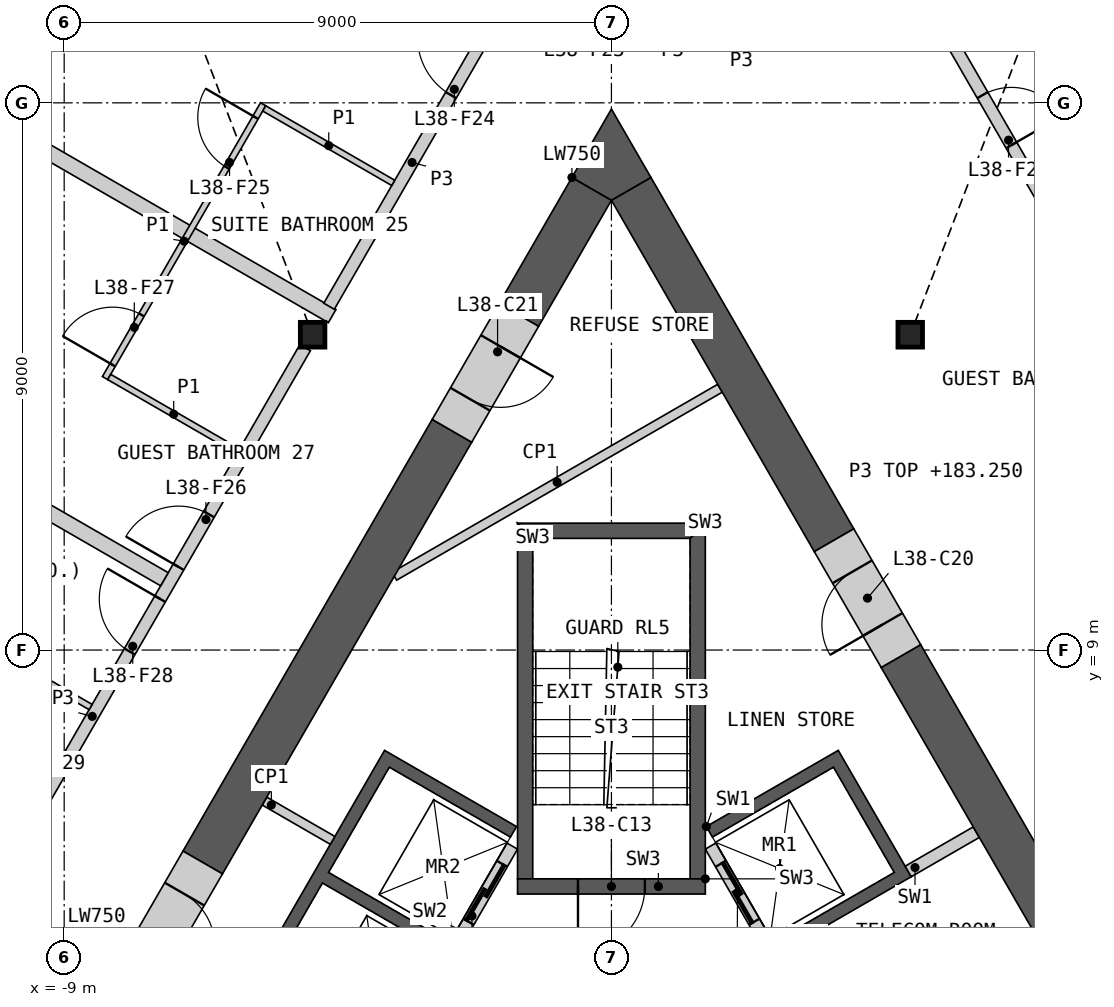
"""IFC4 building model, lengths in metres.
Left out: names, types, materials, properties, quantities, classifications, styles, units other than length and angle.
Written with IfcOpenShell. Run it as: python <this file> out.ifc"""

import sys

from ifc_helpers import new_model, si_unit, direction, frame, frame_2d, origin, origin_2d, place, context, subcontext, project, spatial, polyline, rectangle, i_section, outline, extrude, element, fill, save


model = new_model("IFC4")
c1 = context("Model", 3, precision=1e-05, world=origin(), true_north=direction((0.0, 1.0)))
c2 = subcontext(c1, "Body", "Model", "MODEL_VIEW")
j1 = project(units=[si_unit("LENGTHUNIT", "METRE"), si_unit("PLANEANGLEUNIT", "RADIAN")], contexts=[c1])
p1 = place(None, origin())
s1 = spatial("IfcSite", under=j1, at=p1, CompositionType="ELEMENT")
p2 = place(p1, origin())
s2 = spatial("IfcBuilding", under=s1, at=p2, CompositionType="ELEMENT")
p3 = place(p2, frame((0.0, 0.0, 180.0)))
s3 = spatial("IfcBuildingStorey", under=s2, at=p3, CompositionType="ELEMENT", Elevation=180.0)
for number, where, z_axis, x_axis in (
    (1, (-4.914, 14.186, 0.0), (0.0, 0.0, 1.0), (1.0, 0.0, 0.0)),
    (2, (4.914, 14.186, 0.0), (0.0, 0.0, 1.0), (1.0, 0.0, 0.0)),
):
    element("IfcColumn", number, at=place(p3, frame(where, z_axis=z_axis, x_axis=x_axis)), inside=s3, PredefinedType="COLUMN", context=c2, shape_type="SweptSolid", body=[
        extrude(i_section(OverallWidth=0.404, OverallDepth=0.407, WebThickness=0.027, FlangeThickness=0.044, at=origin_2d()), origin(), (0.0, 0.0, 1.0), 3.6),
    ])
p4 = place(p3, origin())
e3 = element("IfcWall", 3, at=p4, inside=s3, PredefinedType="SHEAR", context=c2, shape_type="SweptSolid", body=[
    extrude(outline(polyline([(1.561, 6.097), (3.731, 7.35), (4.931, 5.272), (2.76, 4.019), (2.66, 4.192), (4.652, 5.342), (3.652, 7.074), (1.66, 5.924), (1.561, 6.097)])), origin(), (0.0, 0.0, 1.0), 3.25),
])
p5 = place(p3, frame((5.817, -1.476, 0.0), z_axis=(0.0, 0.0, 1.0), x_axis=(-0.500002616675, 0.866023893041, 0.0)))
e4 = element("IfcWall", 4, at=p5, inside=s3, PredefinedType="SOLIDWALL", context=c2, shape_type="SweptSolid", body=[
    extrude(rectangle(XDim=8.373, YDim=0.2, at=frame_2d((4.187, 0.0))), origin(), (0.0, 0.0, 1.0), 3.25),
])
p6 = place(p5, frame((1.537, 0.0, 0.0)))
e5 = element("IfcOpeningElement", 5, at=p6, cuts=e4, PredefinedType="OPENING", context=c2, shape_type="SweptSolid", body=[
    extrude(rectangle(XDim=0.9, YDim=2.1, at=frame_2d((0.45, 1.05))), frame((0.0, 0.11, 0.0), z_axis=(0.0, -1.0, 0.0), x_axis=(1.0, 0.0, 0.0)), (0.0, 0.0, 1.0), 0.22),
])
p7 = place(p5, frame((4.837, 0.0, 0.0)))
e6 = element("IfcOpeningElement", 6, at=p7, cuts=e4, PredefinedType="OPENING", context=c2, shape_type="SweptSolid", body=[
    extrude(rectangle(XDim=0.9, YDim=2.1, at=frame_2d((0.45, 1.05))), frame((0.0, 0.11, 0.0), z_axis=(0.0, -1.0, 0.0), x_axis=(1.0, 0.0, 0.0)), (0.0, 0.0, 1.0), 0.22),
])
p8 = place(p5, frame((6.937, 0.0, 0.0)))
e7 = element("IfcOpeningElement", 7, at=p8, cuts=e4, PredefinedType="OPENING", context=c2, shape_type="SweptSolid", body=[
    extrude(rectangle(XDim=1.1, YDim=2.1, at=frame_2d((0.55, 1.05))), frame((0.0, 0.11, 0.0), z_axis=(0.0, -1.0, 0.0), x_axis=(1.0, 0.0, 0.0)), (0.0, 0.0, 1.0), 0.22),
])
p9 = place(p3, frame((4.881, 5.358, 0.0), z_axis=(0.0, 0.0, 1.0), x_axis=(0.866084958089, 0.499896834728, 0.0)))
e8 = element("IfcWall", 8, at=p9, inside=s3, PredefinedType="SHEAR", context=c2, shape_type="SweptSolid", body=[
    extrude(rectangle(XDim=1.293, YDim=0.2, at=frame_2d((0.646, 0.0))), origin(), (0.0, 0.0, 1.0), 3.25),
])
p10 = place(p3, origin())
e9 = element("IfcWall", 9, at=p10, inside=s3, PredefinedType="SHEAR", context=c2, shape_type="SweptSolid", body=[
    extrude(outline(polyline([(-4.96, 0.208), (-7.131, 1.461), (-3.731, 7.35), (-1.561, 6.097), (-1.66, 5.924), (-3.652, 7.074), (-4.652, 5.342), (-2.66, 4.192), (-2.76, 4.019), (-4.752, 5.169), (-5.752, 3.437), (-3.76, 2.287), (-3.861, 2.113), (-5.852, 3.263), (-6.852, 1.531), (-4.861, 0.381), (-4.96, 0.208)])), origin(), (0.0, 0.0, 1.0), 3.25),
])
p11 = place(p3, frame((-1.631, 5.776, 0.0), z_axis=(0.0, 0.0, 1.0), x_axis=(-0.499992876559, -0.866029516466, 0.0)))
e10 = element("IfcWall", 10, at=p11, inside=s3, PredefinedType="SOLIDWALL", context=c2, shape_type="SweptSolid", body=[
    extrude(rectangle(XDim=6.486, YDim=0.2, at=frame_2d((3.243, 0.0))), origin(), (0.0, 0.0, 1.0), 3.25),
])
p12 = place(p11, frame((0.337, 0.0, 0.0)))
e11 = element("IfcOpeningElement", 11, at=p12, cuts=e10, PredefinedType="OPENING", context=c2, shape_type="SweptSolid", body=[
    extrude(rectangle(XDim=1.1, YDim=2.1, at=frame_2d((0.55, 1.05))), frame((0.0, 0.11, 0.0), z_axis=(0.0, -1.0, 0.0), x_axis=(1.0, 0.0, 0.0)), (0.0, 0.0, 1.0), 0.22),
])
p13 = place(p11, frame((2.537, 0.0, 0.0)))
e12 = element("IfcOpeningElement", 12, at=p13, cuts=e10, PredefinedType="OPENING", context=c2, shape_type="SweptSolid", body=[
    extrude(rectangle(XDim=1.1, YDim=2.1, at=frame_2d((0.55, 1.05))), frame((0.0, 0.11, 0.0), z_axis=(0.0, -1.0, 0.0), x_axis=(1.0, 0.0, 0.0)), (0.0, 0.0, 1.0), 0.22),
])
p14 = place(p3, origin())
e13 = element("IfcWall", 13, at=p14, inside=s3, PredefinedType="SHEAR", context=c2, shape_type="SweptSolid", body=[
    extrude(outline(polyline([(1.544, 5.237), (1.544, 11.087), (1.294, 10.837), (1.294, 5.237), (1.544, 5.237)])), origin(), (0.0, 0.0, 1.0), 3.25),
])
p15 = place(p3, origin())
e14 = element("IfcWall", 14, at=p15, inside=s3, PredefinedType="SHEAR", context=c2, shape_type="SweptSolid", body=[
    extrude(outline(polyline([(1.544, 11.087), (-1.544, 11.087), (-1.294, 10.837), (1.294, 10.837), (1.544, 11.087)])), origin(), (0.0, 0.0, 1.0), 3.25),
])
p16 = place(p3, origin())
e15 = element("IfcWall", 15, at=p16, inside=s3, PredefinedType="SHEAR", context=c2, shape_type="SweptSolid", body=[
    extrude(outline(polyline([(-1.294, 10.837), (-1.544, 11.087), (-1.544, 5.237), (-1.294, 5.237), (-1.294, 10.837)])), origin(), (0.0, 0.0, 1.0), 3.25),
])
p17 = place(p3, frame((1.544, 5.112, 0.0), z_axis=(0.0, 0.0, 1.0), x_axis=(-1.0, 0.0, 0.0)))
e16 = element("IfcWall", 16, at=p17, inside=s3, PredefinedType="SHEAR", context=c2, shape_type="SweptSolid", body=[
    extrude(rectangle(XDim=3.088, YDim=0.25, at=frame_2d((1.544, 0.0))), origin(), (0.0, 0.0, 1.0), 3.25),
])
p18 = place(p17, frame((0.994, 0.0, 0.0)))
e17 = element("IfcOpeningElement", 17, at=p18, cuts=e16, PredefinedType="OPENING", context=c2, shape_type="SweptSolid", body=[
    extrude(rectangle(XDim=1.1, YDim=2.1, at=frame_2d((0.55, 1.05))), frame((0.0, 0.135, 0.0), z_axis=(0.0, -1.0, 0.0), x_axis=(1.0, 0.0, 0.0)), (0.0, 0.0, 1.0), 0.27),
])
p19 = place(p3, frame((-5.705, 6.516, 0.0), z_axis=(0.0, 0.0, 1.0), x_axis=(0.866003189247, -0.500038474733, 0.0)))
e18 = element("IfcWall", 18, at=p19, inside=s3, PredefinedType="PARTITIONING", context=c2, shape_type="SweptSolid", body=[
    extrude(rectangle(XDim=1.293, YDim=0.15, at=frame_2d((0.646, 0.0))), origin(), (0.0, 0.0, 1.0), 3.25),
])
p20 = place(p3, frame((1.785, 13.306, 0.0), z_axis=(0.0, 0.0, 1.0), x_axis=(-0.866038319186, -0.499977629202, 0.0)))
e19 = element("IfcWall", 19, at=p20, inside=s3, PredefinedType="PARTITIONING", context=c2, shape_type="SweptSolid", body=[
    extrude(rectangle(XDim=6.184, YDim=0.15, at=frame_2d((3.092, 0.0))), origin(), (0.0, 0.0, 1.0), 3.25),
])
p21 = place(p3, frame((3.661, 10.806, 0.0), z_axis=(0.0, 0.0, 1.0), x_axis=(-0.500014865866, 0.866016820803, 0.0)))
e20 = element("IfcWall", 20, at=p21, inside=s3, PredefinedType="SHEAR", context=c2, shape_type="SweptSolid", body=[
    extrude(rectangle(XDim=6.673, YDim=0.75, at=frame_2d((3.336, 0.0))), origin(), (0.0, 0.0, 1.0), 3.25),
])
p22 = place(p3, frame((7.964, 3.354, 0.0), z_axis=(0.0, 0.0, 1.0), x_axis=(-0.50002928721, 0.866008494146, 0.0)))
e21 = element("IfcWall", 21, at=p22, inside=s3, PredefinedType="SHEAR", context=c2, shape_type="SweptSolid", body=[
    extrude(rectangle(XDim=6.405, YDim=0.75, at=frame_2d((3.203, 0.0))), origin(), (0.0, 0.0, 1.0), 3.25),
])
p23 = place(p3, frame((-2.622, 12.606, 0.0), z_axis=(0.0, 0.0, 1.0), x_axis=(-0.500014611105, -0.866016967894, 0.0)))
e22 = element("IfcWall", 22, at=p23, inside=s3, PredefinedType="SHEAR", context=c2, shape_type="SweptSolid", body=[
    extrude(rectangle(XDim=8.198, YDim=0.75, at=frame_2d((4.099, 0.0))), origin(), (0.0, 0.0, 1.0), 3.25),
])
p24 = place(p3, frame((-0.325, 16.585, 0.0), z_axis=(0.0, 0.0, 1.0), x_axis=(-0.500019473932, -0.866014160212, 0.0)))
e23 = element("IfcWall", 23, at=p24, inside=s3, PredefinedType="SHEAR", context=c2, shape_type="SweptSolid", body=[
    extrude(rectangle(XDim=2.396, YDim=0.75, at=frame_2d((1.198, 0.0))), origin(), (0.0, 0.0, 1.0), 3.25),
])
p25 = place(p3, origin())
e24 = element("IfcWall", 24, at=p25, inside=s3, PredefinedType="SHEAR", context=c2, shape_type="SweptSolid", body=[
    extrude(outline(polyline([(-0.649, 16.773), (0.0, 17.898), (0.649, 16.773), (0.0, 16.398), (-0.649, 16.773)])), origin(), (0.0, 0.0, 1.0), 3.25),
])
p26 = place(p3, frame((-6.721, 5.506, 0.0), z_axis=(0.0, 0.0, 1.0), x_axis=(-0.499946605688, -0.86605622881, 0.0)))
e25 = element("IfcWall", 25, at=p26, inside=s3, PredefinedType="SHEAR", context=c2, shape_type="SweptSolid", body=[
    extrude(rectangle(XDim=2.2, YDim=0.75, at=frame_2d((1.1, 0.0))), origin(), (0.0, 0.0, 1.0), 3.25),
])
p27 = place(p26, frame((0.6, 0.0, 0.0)))
e26 = element("IfcOpeningElement", 26, at=p27, cuts=e25, PredefinedType="OPENING", context=c2, shape_type="SweptSolid", body=[
    extrude(rectangle(XDim=1.0, YDim=2.1, at=frame_2d((0.5, 1.05))), frame((0.0, 0.385, 0.0), z_axis=(0.0, -1.0, 0.0), x_axis=(1.0, 0.0, 0.0)), (0.0, 0.0, 1.0), 0.77),
])
p28 = place(p3, frame((4.761, 8.901, 0.0), z_axis=(0.0, 0.0, 1.0), x_axis=(-0.499898558967, 0.866083962871, 0.0)))
e27 = element("IfcWall", 27, at=p28, inside=s3, PredefinedType="SHEAR", context=c2, shape_type="SweptSolid", body=[
    extrude(rectangle(XDim=2.2, YDim=0.75, at=frame_2d((1.1, 0.0))), origin(), (0.0, 0.0, 1.0), 3.25),
])
p29 = place(p28, frame((0.6, 0.0, 0.0)))
e28 = element("IfcOpeningElement", 28, at=p29, cuts=e27, PredefinedType="OPENING", context=c2, shape_type="SweptSolid", body=[
    extrude(rectangle(XDim=1.0, YDim=2.1, at=frame_2d((0.5, 1.05))), frame((0.0, 0.385, 0.0), z_axis=(0.0, -1.0, 0.0), x_axis=(1.0, 0.0, 0.0)), (0.0, 0.0, 1.0), 0.77),
])
p30 = place(p3, frame((-1.522, 14.511, 0.0), z_axis=(0.0, 0.0, 1.0), x_axis=(-0.499946605688, -0.86605622881, 0.0)))
e29 = element("IfcWall", 29, at=p30, inside=s3, PredefinedType="SHEAR", context=c2, shape_type="SweptSolid", body=[
    extrude(rectangle(XDim=2.2, YDim=0.75, at=frame_2d((1.1, 0.0))), origin(), (0.0, 0.0, 1.0), 3.25),
])
p31 = place(p30, frame((0.6, 0.0, 0.0)))
e30 = element("IfcOpeningElement", 30, at=p31, cuts=e29, PredefinedType="OPENING", context=c2, shape_type="SweptSolid", body=[
    extrude(rectangle(XDim=1.0, YDim=2.1, at=frame_2d((0.5, 1.05))), frame((0.0, 0.385, 0.0), z_axis=(0.0, -1.0, 0.0), x_axis=(1.0, 0.0, 0.0)), (0.0, 0.0, 1.0), 0.77),
])
p32 = place(p3, frame((5.377, 19.385, 0.0), z_axis=(0.0, 0.0, 1.0), x_axis=(0.500000757641, -0.86602496636, 0.0)))
e31 = element("IfcWall", 31, at=p32, inside=s3, PredefinedType="PARTITIONING", context=c2, shape_type="SweptSolid", body=[
    extrude(rectangle(XDim=28.198, YDim=0.2, at=frame_2d((14.099, 0.0))), origin(), (0.0, 0.0, 1.0), 3.25),
])
p33 = place(p32, frame((22.735, 0.0, 0.0)))
e32 = element("IfcOpeningElement", 32, at=p33, cuts=e31, PredefinedType="OPENING", context=c2, shape_type="SweptSolid", body=[
    extrude(rectangle(XDim=1.8, YDim=2.1, at=frame_2d((0.9, 1.05))), frame((0.0, 0.11, 0.0), z_axis=(0.0, -1.0, 0.0), x_axis=(1.0, 0.0, 0.0)), (0.0, 0.0, 1.0), 0.22),
])
p34 = place(p32, frame((14.402, 0.0, 0.0)))
e33 = element("IfcOpeningElement", 33, at=p34, cuts=e31, PredefinedType="OPENING", context=c2, shape_type="SweptSolid", body=[
    extrude(rectangle(XDim=1.0, YDim=2.1, at=frame_2d((0.5, 1.05))), frame((0.0, 0.11, 0.0), z_axis=(0.0, -1.0, 0.0), x_axis=(1.0, 0.0, 0.0)), (0.0, 0.0, 1.0), 0.22),
])
p35 = place(p32, frame((12.796, 0.0, 0.0)))
e34 = element("IfcOpeningElement", 34, at=p35, cuts=e31, PredefinedType="OPENING", context=c2, shape_type="SweptSolid", body=[
    extrude(rectangle(XDim=1.0, YDim=2.1, at=frame_2d((0.5, 1.05))), frame((0.0, 0.11, 0.0), z_axis=(0.0, -1.0, 0.0), x_axis=(1.0, 0.0, 0.0)), (0.0, 0.0, 1.0), 0.22),
])
p36 = place(p32, frame((4.164, 0.0, 0.0)))
e35 = element("IfcOpeningElement", 35, at=p36, cuts=e31, PredefinedType="OPENING", context=c2, shape_type="SweptSolid", body=[
    extrude(rectangle(XDim=1.0, YDim=2.1, at=frame_2d((0.5, 1.05))), frame((0.0, 0.11, 0.0), z_axis=(0.0, -1.0, 0.0), x_axis=(1.0, 0.0, 0.0)), (0.0, 0.0, 1.0), 0.22),
])
p37 = place(p32, frame((1.452, 0.0, 0.0)))
e36 = element("IfcOpeningElement", 36, at=p37, cuts=e31, PredefinedType="OPENING", context=c2, shape_type="SweptSolid", body=[
    extrude(rectangle(XDim=0.95, YDim=2.1, at=frame_2d((0.475, 1.05))), frame((0.0, 0.11, 0.0), z_axis=(0.0, -1.0, 0.0), x_axis=(1.0, 0.0, 0.0)), (0.0, 0.0, 1.0), 0.22),
])
p38 = place(p3, frame((-15.835, 20.983, 0.0), z_axis=(0.0, 0.0, 1.0), x_axis=(0.866022720283, -0.500004647933, 0.0)))
e37 = element("IfcWall", 37, at=p38, inside=s3, PredefinedType="PARTITIONING", context=c2, shape_type="SweptSolid", body=[
    extrude(rectangle(XDim=12.981, YDim=0.25, at=frame_2d((6.49, 0.0))), origin(), (0.0, 0.0, 1.0), 2.404),
])
p39 = place(p3, frame((-9.705, 5.888, 0.0), z_axis=(0.0, 0.0, 1.0), x_axis=(0.50000393355, 0.866023132736, 0.0)))
e38 = element("IfcWall", 38, at=p39, inside=s3, PredefinedType="PARTITIONING", context=c2, shape_type="SweptSolid", body=[
    extrude(rectangle(XDim=9.335, YDim=0.2, at=frame_2d((4.667, 0.0))), origin(), (0.0, 0.0, 1.0), 3.25),
])
p40 = place(p39, frame((5.172, 0.0, 0.0)))
e39 = element("IfcOpeningElement", 39, at=p40, cuts=e38, PredefinedType="OPENING", context=c2, shape_type="SweptSolid", body=[
    extrude(rectangle(XDim=1.0, YDim=2.1, at=frame_2d((0.5, 1.05))), frame((0.0, 0.11, 0.0), z_axis=(0.0, -1.0, 0.0), x_axis=(1.0, 0.0, 0.0)), (0.0, 0.0, 1.0), 0.22),
])
p41 = place(p39, frame((3.565, 0.0, 0.0)))
e40 = element("IfcOpeningElement", 40, at=p41, cuts=e38, PredefinedType="OPENING", context=c2, shape_type="SweptSolid", body=[
    extrude(rectangle(XDim=1.0, YDim=2.1, at=frame_2d((0.5, 1.05))), frame((0.0, 0.11, 0.0), z_axis=(0.0, -1.0, 0.0), x_axis=(1.0, 0.0, 0.0)), (0.0, 0.0, 1.0), 0.22),
])
p42 = place(p3, frame((-14.39, 14.228, 0.0), z_axis=(0.0, 0.0, 1.0), x_axis=(0.866031008936, -0.499990291468, 0.0)))
e41 = element("IfcWall", 41, at=p42, inside=s3, PredefinedType="PARTITIONING", context=c2, shape_type="SweptSolid", body=[
    extrude(rectangle(XDim=8.127, YDim=0.25, at=frame_2d((4.063, 0.0))), origin(), (0.0, 0.0, 1.0), 2.404),
])
p43 = place(p3, frame((-4.644, 14.655, 0.0), z_axis=(0.0, 0.0, 1.0), x_axis=(0.49998041698, 0.866036709751, 0.0)))
e42 = element("IfcWall", 42, at=p43, inside=s3, PredefinedType="PARTITIONING", context=c2, shape_type="SweptSolid", body=[
    extrude(rectangle(XDim=5.462, YDim=0.2, at=frame_2d((2.731, 0.0))), origin(), (0.0, 0.0, 1.0), 3.25),
])
p44 = place(p43, frame((4.01, 0.0, 0.0)))
e43 = element("IfcOpeningElement", 43, at=p44, cuts=e42, PredefinedType="OPENING", context=c2, shape_type="SweptSolid", body=[
    extrude(rectangle(XDim=1.1, YDim=2.1, at=frame_2d((0.55, 1.05))), frame((0.0, 0.11, 0.0), z_axis=(0.0, -1.0, 0.0), x_axis=(1.0, 0.0, 0.0)), (0.0, 0.0, 1.0), 0.22),
])
p45 = place(p3, frame((-8.328, 13.473, 0.0), z_axis=(0.0, 0.0, 1.0), x_axis=(0.499992051641, 0.866029992723, 0.0)))
e44 = element("IfcWall", 44, at=p45, inside=s3, PredefinedType="PARTITIONING", context=c2, shape_type="SweptSolid", body=[
    extrude(rectangle(XDim=5.2, YDim=0.1, at=frame_2d((2.6, 0.0))), origin(), (0.0, 0.0, 1.0), 2.404),
])
p46 = place(p45, frame((4.0, 0.0, 0.0)))
e45 = element("IfcOpeningElement", 45, at=p46, cuts=e44, PredefinedType="OPENING", context=c2, shape_type="SweptSolid", body=[
    extrude(rectangle(XDim=0.95, YDim=2.1, at=frame_2d((0.475, 1.05))), frame((0.0, 0.06, 0.0), z_axis=(0.0, -1.0, 0.0), x_axis=(1.0, 0.0, 0.0)), (0.0, 0.0, 1.0), 0.12),
])
p47 = place(p45, frame((0.25, 0.0, 0.0)))
e46 = element("IfcOpeningElement", 46, at=p47, cuts=e44, PredefinedType="OPENING", context=c2, shape_type="SweptSolid", body=[
    extrude(rectangle(XDim=0.95, YDim=2.1, at=frame_2d((0.475, 1.05))), frame((0.0, 0.06, 0.0), z_axis=(0.0, -1.0, 0.0), x_axis=(1.0, 0.0, 0.0)), (0.0, 0.0, 1.0), 0.12),
])
p48 = place(p3, frame((-5.71, 17.908, 0.0), z_axis=(0.0, 0.0, 1.0), x_axis=(0.866057815567, -0.499943856944, 0.0)))
e47 = element("IfcWall", 47, at=p48, inside=s3, PredefinedType="PARTITIONING", context=c2, shape_type="SweptSolid", body=[
    extrude(rectangle(XDim=2.45, YDim=0.1, at=frame_2d((1.225, 0.0))), origin(), (0.0, 0.0, 1.0), 2.404),
])
p49 = place(p3, frame((-8.26, 13.492, 0.0), z_axis=(0.0, 0.0, 1.0), x_axis=(0.866014668023, -0.500018594424, 0.0)))
e48 = element("IfcWall", 48, at=p49, inside=s3, PredefinedType="PARTITIONING", context=c2, shape_type="SweptSolid", body=[
    extrude(rectangle(XDim=2.45, YDim=0.1, at=frame_2d((1.225, 0.0))), origin(), (0.0, 0.0, 1.0), 2.404),
])
p50 = place(p3, frame((-10.687, 9.288, 0.0), z_axis=(0.0, 0.0, 1.0), x_axis=(0.866032905446, -0.499987006516, 0.0)))
e49 = element("IfcWall", 49, at=p50, inside=s3, PredefinedType="PARTITIONING", context=c2, shape_type="SweptSolid", body=[
    extrude(rectangle(XDim=2.45, YDim=0.1, at=frame_2d((1.225, 0.0))), origin(), (0.0, 0.0, 1.0), 2.404),
])
p51 = place(p8, origin())
e50 = element("IfcDoor", 50, at=p51, inside=s3, OperationType="SLIDING_TO_LEFT", PredefinedType="DOOR", context=c2, shape_type="SweptSolid", body=[
    extrude(rectangle(XDim=1.1, YDim=2.1, at=frame_2d((0.55, 1.05))), frame((0.0, 0.025, 0.0), z_axis=(0.0, -1.0, 0.0), x_axis=(1.0, 0.0, 0.0)), (0.0, 0.0, 1.0), 0.05),
])
fill(e7, e50)
p52 = place(p12, origin())
e51 = element("IfcDoor", 51, at=p52, inside=s3, OperationType="SLIDING_TO_LEFT", PredefinedType="DOOR", context=c2, shape_type="SweptSolid", body=[
    extrude(rectangle(XDim=1.1, YDim=2.1, at=frame_2d((0.55, 1.05))), frame((0.0, 0.025, 0.0), z_axis=(0.0, -1.0, 0.0), x_axis=(1.0, 0.0, 0.0)), (0.0, 0.0, 1.0), 0.05),
])
fill(e11, e51)
p53 = place(p18, origin())
e52 = element("IfcDoor", 52, at=p53, inside=s3, OperationType="SINGLE_SWING_RIGHT", PredefinedType="DOOR", context=c2, shape_type="SweptSolid", body=[
    extrude(rectangle(XDim=1.1, YDim=2.1, at=frame_2d((0.55, 1.05))), frame((0.0, 0.025, 0.0), z_axis=(0.0, -1.0, 0.0), x_axis=(1.0, 0.0, 0.0)), (0.0, 0.0, 1.0), 0.05),
])
fill(e17, e52)
p54 = place(p27, origin())
e53 = element("IfcDoor", 53, at=p54, inside=s3, OperationType="SINGLE_SWING_RIGHT", PredefinedType="DOOR", context=c2, shape_type="SweptSolid", body=[
    extrude(rectangle(XDim=1.0, YDim=2.1, at=frame_2d((0.5, 1.05))), frame((0.0, 0.13, 0.0), z_axis=(0.0, -1.0, 0.0), x_axis=(1.0, 0.0, 0.0)), (0.0, 0.0, 1.0), 0.05),
])
fill(e26, e53)
p55 = place(p29, origin())
e54 = element("IfcDoor", 54, at=p55, inside=s3, OperationType="SINGLE_SWING_LEFT", PredefinedType="DOOR", context=c2, shape_type="SweptSolid", body=[
    extrude(rectangle(XDim=1.0, YDim=2.1, at=frame_2d((0.5, 1.05))), frame((0.0, 0.13, 0.0), z_axis=(0.0, -1.0, 0.0), x_axis=(1.0, 0.0, 0.0)), (0.0, 0.0, 1.0), 0.05),
])
fill(e28, e54)
p56 = place(p31, origin())
e55 = element("IfcDoor", 55, at=p56, inside=s3, OperationType="SINGLE_SWING_LEFT", PredefinedType="DOOR", context=c2, shape_type="SweptSolid", body=[
    extrude(rectangle(XDim=1.0, YDim=2.1, at=frame_2d((0.5, 1.05))), frame((0.0, 0.13, 0.0), z_axis=(0.0, -1.0, 0.0), x_axis=(1.0, 0.0, 0.0)), (0.0, 0.0, 1.0), 0.05),
])
fill(e30, e55)
p57 = place(p37, origin())
e56 = element("IfcDoor", 56, at=p57, inside=s3, OperationType="SINGLE_SWING_RIGHT", PredefinedType="DOOR", context=c2, shape_type="SweptSolid", body=[
    extrude(rectangle(XDim=0.95, YDim=2.1, at=frame_2d((0.475, 1.05))), frame((0.0, 0.025, 0.0), z_axis=(0.0, -1.0, 0.0), x_axis=(1.0, 0.0, 0.0)), (0.0, 0.0, 1.0), 0.05),
])
fill(e36, e56)
p58 = place(p44, origin())
e57 = element("IfcDoor", 57, at=p58, inside=s3, OperationType="SINGLE_SWING_RIGHT", PredefinedType="DOOR", context=c2, shape_type="SweptSolid", body=[
    extrude(rectangle(XDim=1.1, YDim=2.1, at=frame_2d((0.55, 1.05))), frame((0.0, 0.025, 0.0), z_axis=(0.0, -1.0, 0.0), x_axis=(1.0, 0.0, 0.0)), (0.0, 0.0, 1.0), 0.05),
])
fill(e43, e57)
p59 = place(p46, origin())
e58 = element("IfcDoor", 58, at=p59, inside=s3, OperationType="SINGLE_SWING_RIGHT", PredefinedType="DOOR", context=c2, shape_type="SweptSolid", body=[
    extrude(rectangle(XDim=0.95, YDim=2.1, at=frame_2d((0.475, 1.05))), frame((0.0, 0.025, 0.0), z_axis=(0.0, -1.0, 0.0), x_axis=(1.0, 0.0, 0.0)), (0.0, 0.0, 1.0), 0.05),
])
fill(e45, e58)
p60 = place(p40, origin())
e59 = element("IfcDoor", 59, at=p60, inside=s3, OperationType="SINGLE_SWING_LEFT", PredefinedType="DOOR", context=c2, shape_type="SweptSolid", body=[
    extrude(rectangle(XDim=1.0, YDim=2.1, at=frame_2d((0.5, 1.05))), frame((0.0, 0.025, 0.0), z_axis=(0.0, -1.0, 0.0), x_axis=(1.0, 0.0, 0.0)), (0.0, 0.0, 1.0), 0.05),
])
fill(e39, e59)
p61 = place(p47, origin())
e60 = element("IfcDoor", 60, at=p61, inside=s3, OperationType="SINGLE_SWING_LEFT", PredefinedType="DOOR", context=c2, shape_type="SweptSolid", body=[
    extrude(rectangle(XDim=0.95, YDim=2.1, at=frame_2d((0.475, 1.05))), frame((0.0, 0.025, 0.0), z_axis=(0.0, -1.0, 0.0), x_axis=(1.0, 0.0, 0.0)), (0.0, 0.0, 1.0), 0.05),
])
fill(e46, e60)
p62 = place(p41, origin())
e61 = element("IfcDoor", 61, at=p62, inside=s3, OperationType="SINGLE_SWING_RIGHT", PredefinedType="DOOR", context=c2, shape_type="SweptSolid", body=[
    extrude(rectangle(XDim=1.0, YDim=2.1, at=frame_2d((0.5, 1.05))), frame((0.0, 0.025, 0.0), z_axis=(0.0, -1.0, 0.0), x_axis=(1.0, 0.0, 0.0)), (0.0, 0.0, 1.0), 0.05),
])
fill(e40, e61)
save(model, sys.argv[1])
